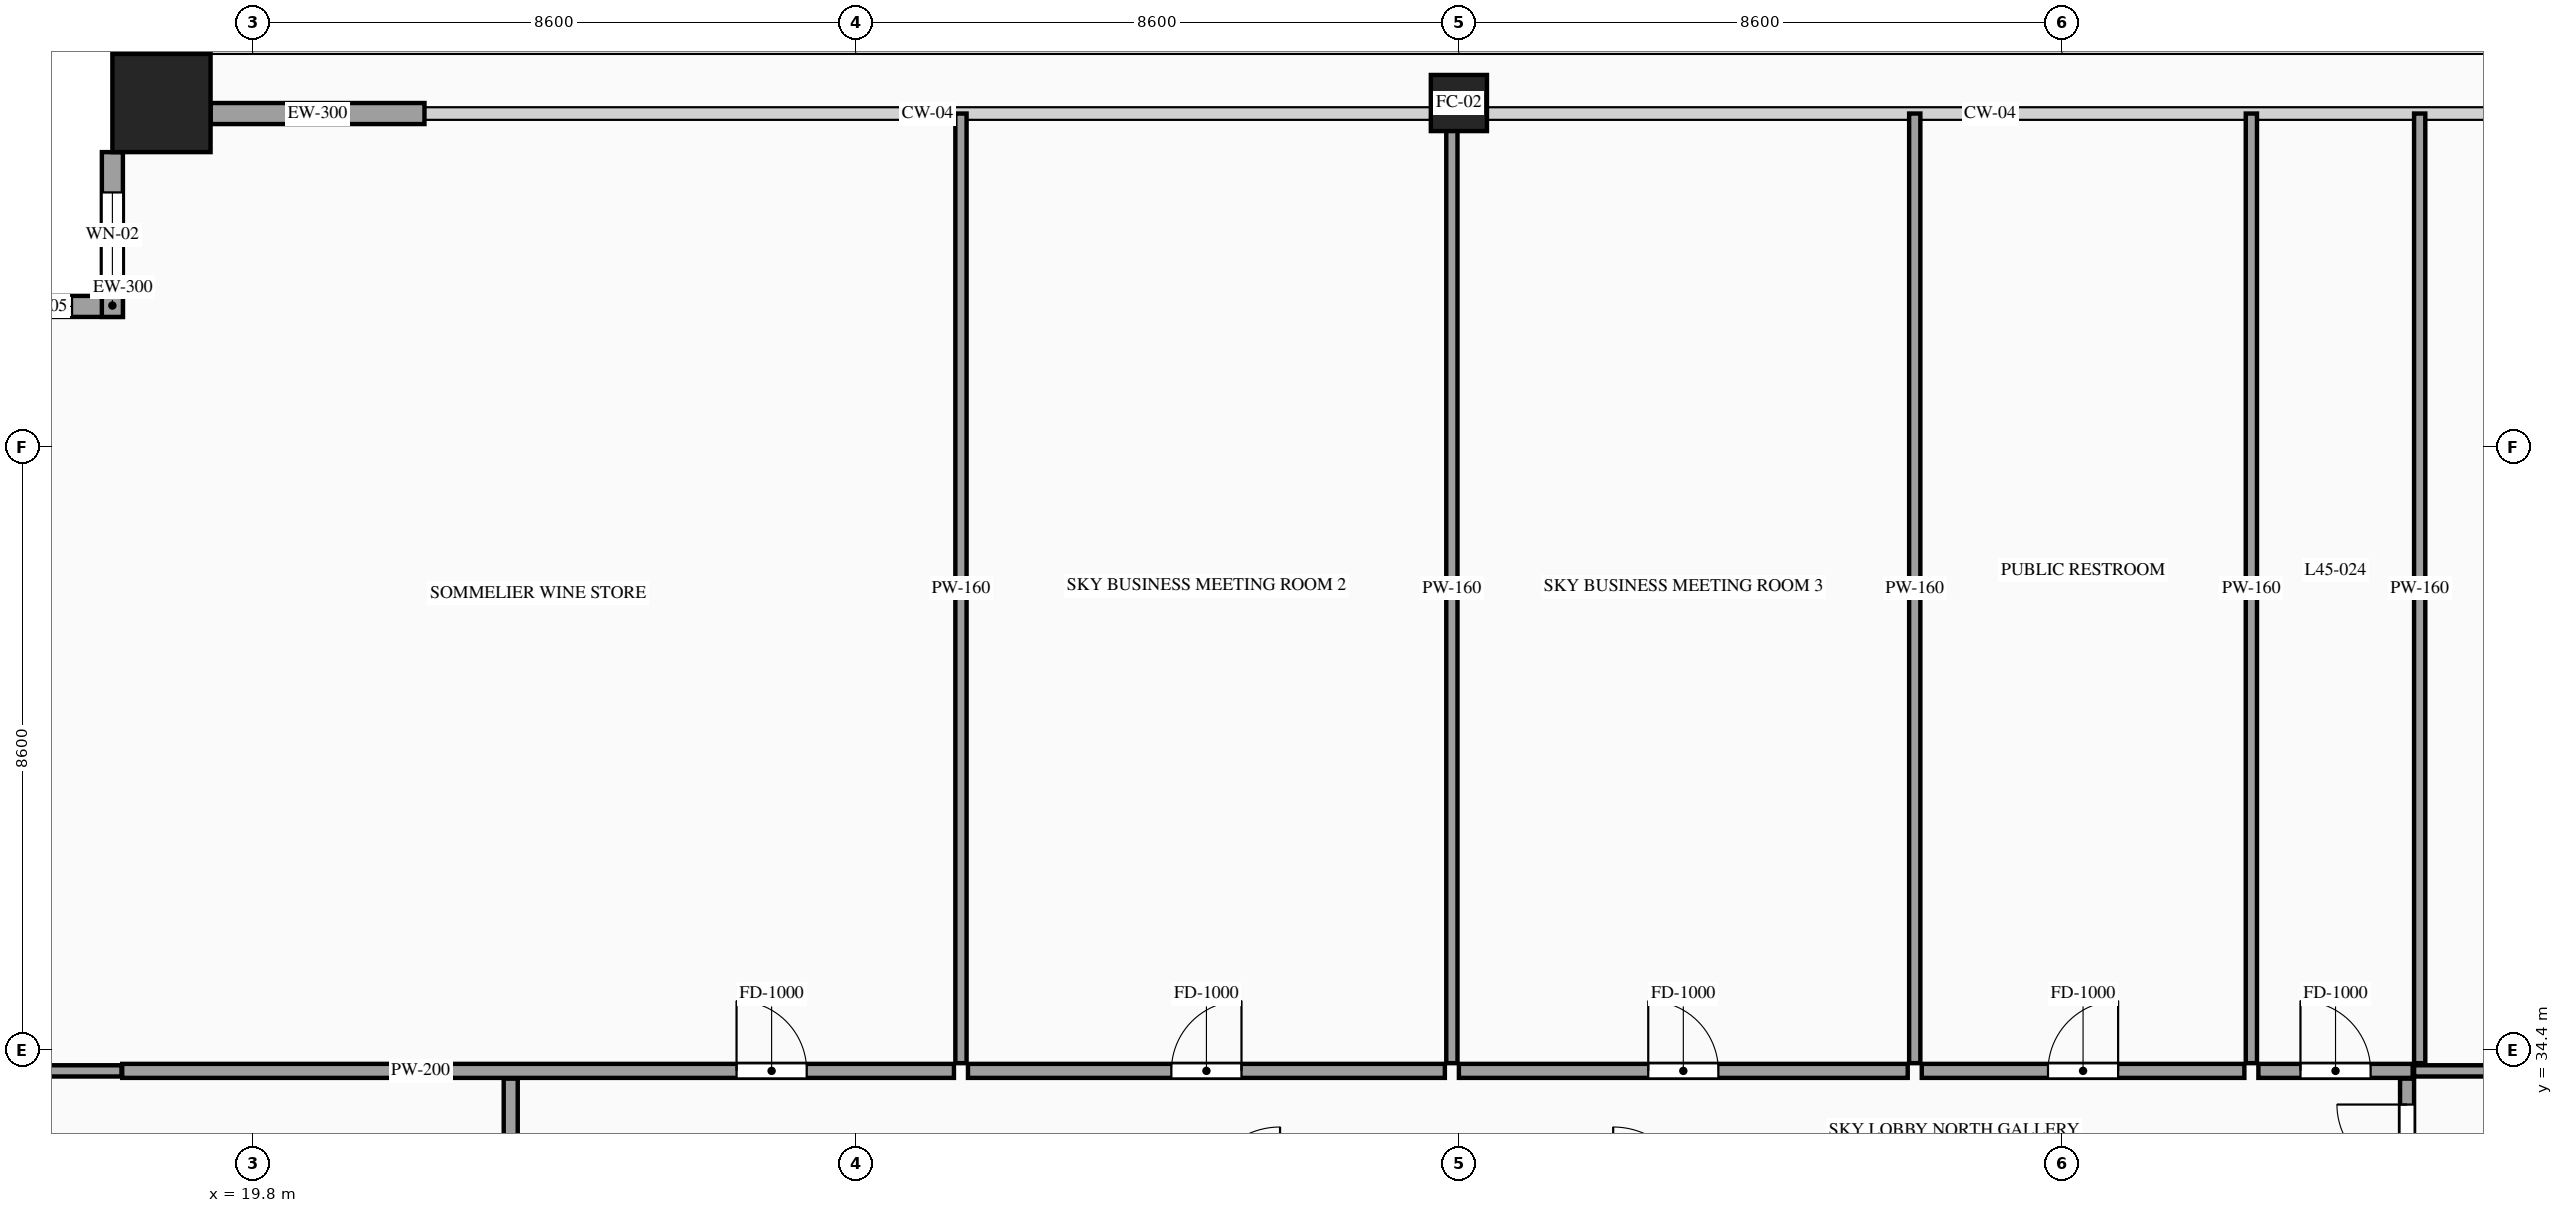
"""IFC4 building model, lengths in metres.
Left out: names, types, materials, properties, quantities, classifications, styles, units other than length and angle.
Written with IfcOpenShell. Run it as: python <this file> out.ifc"""

import sys

from ifc_helpers import new_model, si_unit, direction, frame, frame_2d, origin, origin_2d, place, context, subcontext, project, spatial, rectangle, hollow_rectangle, extrude, source, transform, mapped, element, fill, save


model = new_model("IFC4")
c1 = context("Model", 3, precision=1e-05, world=origin(), true_north=direction((0.0, 1.0)))
c2 = subcontext(c1, "Body", "Model", "MODEL_VIEW")
j1 = project(units=[si_unit("LENGTHUNIT", "METRE"), si_unit("PLANEANGLEUNIT", "RADIAN")], contexts=[c1])
p1 = place(None, origin())
s1 = spatial("IfcSite", under=j1, at=p1, CompositionType="ELEMENT")
p2 = place(p1, origin())
s2 = spatial("IfcBuilding", under=s1, at=p2, CompositionType="ELEMENT")
p3 = place(p2, frame((0.0, 0.0, 171.6)))
s3 = spatial("IfcBuildingStorey", under=s2, at=p3, CompositionType="ELEMENT", Elevation=171.6)
m1 = source(origin(), c2, "Body", "SweptSolid", [
    extrude(hollow_rectangle(XDim=1.4, YDim=1.4, WallThickness=0.06, at=origin_2d()), origin(), (0.0, 0.0, 1.0), 4.8),
])
p4 = place(p3, frame((18.5, 47.9, 0.0), z_axis=(0.0, 0.0, 1.0), x_axis=(1.0, 0.0, 0.0)))
e1 = element("IfcColumn", 1, at=p4, inside=s3, PredefinedType="COLUMN", context=c2, shape_type="MappedRepresentation", body=[
    mapped(m1, transform((0.0, 0.0, 0.0), scale=1.0)),
])
m2 = source(origin(), c2, "Body", "SweptSolid", [
    extrude(hollow_rectangle(XDim=0.8, YDim=0.8, WallThickness=0.036, at=origin_2d()), origin(), (0.0, 0.0, 1.0), 4.8),
])
p5 = place(p3, frame((37.0, 47.9, 0.0), z_axis=(0.0, 0.0, 1.0), x_axis=(1.0, 0.0, 0.0)))
e2 = element("IfcColumn", 2, at=p5, inside=s3, PredefinedType="COLUMN", context=c2, shape_type="MappedRepresentation", body=[
    mapped(m2, transform((0.0, 0.0, 0.0), scale=1.0)),
])
p6 = place(p3, frame((17.95, 45.0, 0.0), z_axis=(0.0, 0.0, 1.0), x_axis=(-1.0, 0.0, 0.0)))
e3 = element("IfcWall", 3, at=p6, inside=s3, PredefinedType="SOLIDWALL", context=c2, shape_type="SweptSolid", body=[
    extrude(rectangle(XDim=2.35, YDim=0.3, at=frame_2d((1.175, 0.0))), origin(), (0.0, 0.0, 1.0), 4.52),
])
p7 = place(p6, frame((0.725, 0.0, 0.85)))
e4 = element("IfcOpeningElement", 4, at=p7, cuts=e3, PredefinedType="OPENING", context=c2, shape_type="SweptSolid", body=[
    extrude(rectangle(XDim=0.9, YDim=1.5, at=frame_2d((0.45, 0.75))), frame((0.0, 0.165, 0.0), z_axis=(0.0, -1.0, 0.0), x_axis=(1.0, 0.0, 0.0)), (0.0, 0.0, 1.0), 0.33),
])
p8 = place(p3, frame((17.8, 47.2, 0.0), z_axis=(0.0, 0.0, 1.0), x_axis=(0.0, -1.0, 0.0)))
e5 = element("IfcWall", 5, at=p8, inside=s3, PredefinedType="SOLIDWALL", context=c2, shape_type="SweptSolid", body=[
    extrude(rectangle(XDim=2.35, YDim=0.3, at=frame_2d((1.175, 0.0))), origin(), (0.0, 0.0, 1.0), 4.52),
])
p9 = place(p8, frame((0.575, 0.0, 0.85)))
e6 = element("IfcOpeningElement", 6, at=p9, cuts=e5, PredefinedType="OPENING", context=c2, shape_type="SweptSolid", body=[
    extrude(rectangle(XDim=1.2, YDim=2.1, at=frame_2d((0.6, 1.05))), frame((0.0, 0.165, 0.0), z_axis=(0.0, -1.0, 0.0), x_axis=(1.0, 0.0, 0.0)), (0.0, 0.0, 1.0), 0.33),
])
m3 = source(origin(), c2, "Body", "SweptSolid", [
    extrude(rectangle(XDim=3.05, YDim=0.3, at=frame_2d((1.525, 0.0))), origin(), (0.0, 0.0, 1.0), 4.075),
])
p10 = place(p3, frame((19.2, 47.75, 0.0), z_axis=(0.0, 0.0, 1.0), x_axis=(1.0, 0.0, 0.0)))
e7 = element("IfcWall", 7, at=p10, inside=s3, PredefinedType="SOLIDWALL", context=c2, shape_type="MappedRepresentation", body=[
    mapped(m3, transform((0.0, 0.0, 0.0), scale=1.0)),
])
m4 = source(origin(), c2, "Body", "SweptSolid", [
    extrude(rectangle(XDim=1.74, YDim=0.2, at=frame_2d((0.87, 0.0))), origin(), (0.0, 0.0, 1.0), 4.52),
])
p11 = place(p3, frame((23.48, 32.25, 0.0), z_axis=(0.0, 0.0, 1.0), x_axis=(0.0, 1.0, 0.0)))
e8 = element("IfcWall", 8, at=p11, inside=s3, PredefinedType="PARTITIONING", context=c2, shape_type="MappedRepresentation", body=[
    mapped(m4, transform((0.0, 0.0, 0.0), scale=1.0)),
])
m5 = source(origin(), c2, "Body", "SweptSolid", [
    extrude(rectangle(XDim=2.88, YDim=0.16, at=frame_2d((1.44, 0.0))), origin(), (0.0, 0.0, 1.0), 4.52),
])
p12 = place(p3, frame((15.05, 34.1, 0.0), z_axis=(0.0, 0.0, 1.0), x_axis=(1.0, 0.0, 0.0)))
e9 = element("IfcWall", 9, at=p12, inside=s3, PredefinedType="PARTITIONING", context=c2, shape_type="MappedRepresentation", body=[
    mapped(m5, transform((0.0, 0.0, 0.0), scale=1.0)),
])
p13 = place(p3, frame((50.52, 32.25, 0.0), z_axis=(0.0, 0.0, 1.0), x_axis=(0.0, 1.0, 0.0)))
e10 = element("IfcWall", 10, at=p13, inside=s3, PredefinedType="PARTITIONING", context=c2, shape_type="SweptSolid", body=[
    extrude(rectangle(XDim=1.74, YDim=0.2, at=frame_2d((0.87, 0.0))), origin(), (0.0, 0.0, 1.0), 4.52),
])
p14 = place(p13, frame((0.37, 0.0, 0.0)))
e11 = element("IfcOpeningElement", 11, at=p14, cuts=e10, PredefinedType="OPENING", context=c2, shape_type="SweptSolid", body=[
    extrude(rectangle(XDim=1.0, YDim=2.2, at=frame_2d((0.5, 1.1))), frame((0.0, 0.115, 0.0), z_axis=(0.0, -1.0, 0.0), x_axis=(1.0, 0.0, 0.0)), (0.0, 0.0, 1.0), 0.23),
])
m6 = source(origin(), c2, "Body", "SweptSolid", [
    extrude(rectangle(XDim=8.33, YDim=0.16, at=frame_2d((4.165, 0.0))), origin(), (0.0, 0.0, 1.0), 4.52),
])
p15 = place(p3, frame((50.62, 34.1, 0.0), z_axis=(0.0, 0.0, 1.0), x_axis=(1.0, 0.0, 0.0)))
e12 = element("IfcWall", 12, at=p15, inside=s3, PredefinedType="PARTITIONING", context=c2, shape_type="MappedRepresentation", body=[
    mapped(m6, transform((0.0, 0.0, 0.0), scale=1.0)),
])
p16 = place(p3, frame((17.94, 34.1, 0.0), z_axis=(0.0, 0.0, 1.0), x_axis=(1.0, 0.0, 0.0)))
e13 = element("IfcWall", 13, at=p16, inside=s3, PredefinedType="PARTITIONING", context=c2, shape_type="SweptSolid", body=[
    extrude(rectangle(XDim=11.86, YDim=0.2, at=frame_2d((5.93, 0.0))), origin(), (0.0, 0.0, 1.0), 4.52),
])
p17 = place(p16, frame((8.76, 0.0, 0.0)))
e14 = element("IfcOpeningElement", 14, at=p17, cuts=e13, PredefinedType="OPENING", context=c2, shape_type="SweptSolid", body=[
    extrude(rectangle(XDim=1.0, YDim=2.2, at=frame_2d((0.5, 1.1))), frame((0.0, 0.115, 0.0), z_axis=(0.0, -1.0, 0.0), x_axis=(1.0, 0.0, 0.0)), (0.0, 0.0, 1.0), 0.23),
])
m7 = source(origin(), c2, "Body", "SweptSolid", [
    extrude(rectangle(XDim=13.54, YDim=0.16, at=frame_2d((6.77, 0.0))), origin(), (0.0, 0.0, 1.0), 4.52),
])
p18 = place(p3, frame((29.9, 34.21, 0.0), z_axis=(0.0, 0.0, 1.0), x_axis=(0.0, 1.0, 0.0)))
e15 = element("IfcWall", 15, at=p18, inside=s3, PredefinedType="PARTITIONING", context=c2, shape_type="MappedRepresentation", body=[
    mapped(m7, transform((0.0, 0.0, 0.0), scale=1.0)),
])
p19 = place(p3, frame((30.0, 34.1, 0.0), z_axis=(0.0, 0.0, 1.0), x_axis=(1.0, 0.0, 0.0)))
e16 = element("IfcWall", 16, at=p19, inside=s3, PredefinedType="PARTITIONING", context=c2, shape_type="SweptSolid", body=[
    extrude(rectangle(XDim=6.8, YDim=0.2, at=frame_2d((3.4, 0.0))), origin(), (0.0, 0.0, 1.0), 4.52),
])
p20 = place(p19, frame((2.9, 0.0, 0.0)))
e17 = element("IfcOpeningElement", 17, at=p20, cuts=e16, PredefinedType="OPENING", context=c2, shape_type="SweptSolid", body=[
    extrude(rectangle(XDim=1.0, YDim=2.2, at=frame_2d((0.5, 1.1))), frame((0.0, 0.115, 0.0), z_axis=(0.0, -1.0, 0.0), x_axis=(1.0, 0.0, 0.0)), (0.0, 0.0, 1.0), 0.23),
])
m8 = source(origin(), c2, "Body", "SweptSolid", [
    extrude(rectangle(XDim=13.54, YDim=0.16, at=frame_2d((6.77, 0.0))), origin(), (0.0, 0.0, 1.0), 3.927),
])
p21 = place(p3, frame((36.9, 34.21, 0.0), z_axis=(0.0, 0.0, 1.0), x_axis=(0.0, 1.0, 0.0)))
e18 = element("IfcWall", 18, at=p21, inside=s3, PredefinedType="PARTITIONING", context=c2, shape_type="MappedRepresentation", body=[
    mapped(m8, transform((0.0, 0.0, 0.0), scale=1.0)),
])
p22 = place(p3, frame((37.0, 34.1, 0.0), z_axis=(0.0, 0.0, 1.0), x_axis=(1.0, 0.0, 0.0)))
e19 = element("IfcWall", 19, at=p22, inside=s3, PredefinedType="PARTITIONING", context=c2, shape_type="SweptSolid", body=[
    extrude(rectangle(XDim=6.4, YDim=0.2, at=frame_2d((3.2, 0.0))), origin(), (0.0, 0.0, 1.0), 4.52),
])
p23 = place(p22, frame((2.7, 0.0, 0.0)))
e20 = element("IfcOpeningElement", 20, at=p23, cuts=e19, PredefinedType="OPENING", context=c2, shape_type="SweptSolid", body=[
    extrude(rectangle(XDim=1.0, YDim=2.2, at=frame_2d((0.5, 1.1))), frame((0.0, 0.115, 0.0), z_axis=(0.0, -1.0, 0.0), x_axis=(1.0, 0.0, 0.0)), (0.0, 0.0, 1.0), 0.23),
])
p24 = place(p3, frame((43.5, 34.21, 0.0), z_axis=(0.0, 0.0, 1.0), x_axis=(0.0, 1.0, 0.0)))
e21 = element("IfcWall", 21, at=p24, inside=s3, PredefinedType="PARTITIONING", context=c2, shape_type="MappedRepresentation", body=[
    mapped(m7, transform((0.0, 0.0, 0.0), scale=1.0)),
])
p25 = place(p3, frame((43.6, 34.1, 0.0), z_axis=(0.0, 0.0, 1.0), x_axis=(1.0, 0.0, 0.0)))
e22 = element("IfcWall", 22, at=p25, inside=s3, PredefinedType="PARTITIONING", context=c2, shape_type="SweptSolid", body=[
    extrude(rectangle(XDim=4.6, YDim=0.2, at=frame_2d((2.3, 0.0))), origin(), (0.0, 0.0, 1.0), 4.52),
])
p26 = place(p25, frame((1.8, 0.0, 0.0)))
e23 = element("IfcOpeningElement", 23, at=p26, cuts=e22, PredefinedType="OPENING", context=c2, shape_type="SweptSolid", body=[
    extrude(rectangle(XDim=1.0, YDim=2.2, at=frame_2d((0.5, 1.1))), frame((0.0, 0.115, 0.0), z_axis=(0.0, -1.0, 0.0), x_axis=(1.0, 0.0, 0.0)), (0.0, 0.0, 1.0), 0.23),
])
p27 = place(p3, frame((48.3, 34.21, 0.0), z_axis=(0.0, 0.0, 1.0), x_axis=(0.0, 1.0, 0.0)))
e24 = element("IfcWall", 24, at=p27, inside=s3, PredefinedType="PARTITIONING", context=c2, shape_type="MappedRepresentation", body=[
    mapped(m7, transform((0.0, 0.0, 0.0), scale=1.0)),
])
p28 = place(p3, frame((48.4, 34.1, 0.0), z_axis=(0.0, 0.0, 1.0), x_axis=(1.0, 0.0, 0.0)))
e25 = element("IfcWall", 25, at=p28, inside=s3, PredefinedType="PARTITIONING", context=c2, shape_type="SweptSolid", body=[
    extrude(rectangle(XDim=2.2, YDim=0.2, at=frame_2d((1.1, 0.0))), origin(), (0.0, 0.0, 1.0), 4.52),
])
p29 = place(p28, frame((0.6, 0.0, 0.0)))
e26 = element("IfcOpeningElement", 26, at=p29, cuts=e25, PredefinedType="OPENING", context=c2, shape_type="SweptSolid", body=[
    extrude(rectangle(XDim=1.0, YDim=2.2, at=frame_2d((0.5, 1.1))), frame((0.0, 0.115, 0.0), z_axis=(0.0, -1.0, 0.0), x_axis=(1.0, 0.0, 0.0)), (0.0, 0.0, 1.0), 0.23),
])
p30 = place(p3, frame((50.7, 34.21, 0.0), z_axis=(0.0, 0.0, 1.0), x_axis=(0.0, 1.0, 0.0)))
e27 = element("IfcWall", 27, at=p30, inside=s3, PredefinedType="PARTITIONING", context=c2, shape_type="MappedRepresentation", body=[
    mapped(m7, transform((0.0, 0.0, 0.0), scale=1.0)),
])
m9 = source(origin(), c2, "Body", "SweptSolid", [
    extrude(rectangle(XDim=0.9, YDim=1.5, at=frame_2d((0.45, 0.75))), frame((0.0, 0.03, 0.0), z_axis=(0.0, -1.0, 0.0), x_axis=(1.0, 0.0, 0.0)), (0.0, 0.0, 1.0), 0.06),
])
p31 = place(p7, origin())
e28 = element("IfcWindow", 28, at=p31, inside=s3, PartitioningType="SINGLE_PANEL", PredefinedType="WINDOW", context=c2, shape_type="MappedRepresentation", body=[
    mapped(m9, transform((0.0, 0.0, 0.0), scale=1.0)),
])
fill(e4, e28)
m10 = source(origin(), c2, "Body", "SweptSolid", [
    extrude(rectangle(XDim=1.2, YDim=2.1, at=frame_2d((0.6, 1.05))), frame((0.0, 0.03, 0.0), z_axis=(0.0, -1.0, 0.0), x_axis=(1.0, 0.0, 0.0)), (0.0, 0.0, 1.0), 0.06),
])
p32 = place(p9, origin())
e29 = element("IfcWindow", 29, at=p32, inside=s3, PartitioningType="SINGLE_PANEL", PredefinedType="WINDOW", context=c2, shape_type="MappedRepresentation", body=[
    mapped(m10, transform((0.0, 0.0, 0.0), scale=1.0)),
])
fill(e6, e29)
m11 = source(origin(), c2, "Body", "SweptSolid", [
    extrude(rectangle(XDim=1.0, YDim=2.2, at=frame_2d((0.5, 1.1))), frame((0.0, 0.025, 0.0), z_axis=(0.0, -1.0, 0.0), x_axis=(1.0, 0.0, 0.0)), (0.0, 0.0, 1.0), 0.05),
])
p33 = place(p14, origin())
e30 = element("IfcDoor", 30, at=p33, inside=s3, OperationType="SINGLE_SWING_RIGHT", PredefinedType="DOOR", context=c2, shape_type="MappedRepresentation", body=[
    mapped(m11, transform((0.0, 0.0, 0.0), scale=1.0)),
])
fill(e11, e30)
p34 = place(p17, origin())
e31 = element("IfcDoor", 31, at=p34, inside=s3, OperationType="SINGLE_SWING_LEFT", PredefinedType="DOOR", context=c2, shape_type="MappedRepresentation", body=[
    mapped(m11, transform((0.0, 0.0, 0.0), scale=1.0)),
])
fill(e14, e31)
p35 = place(p20, origin())
e32 = element("IfcDoor", 32, at=p35, inside=s3, OperationType="SINGLE_SWING_RIGHT", PredefinedType="DOOR", context=c2, shape_type="MappedRepresentation", body=[
    mapped(m11, transform((0.0, 0.0, 0.0), scale=1.0)),
])
fill(e17, e32)
p36 = place(p23, origin())
e33 = element("IfcDoor", 33, at=p36, inside=s3, OperationType="SINGLE_SWING_LEFT", PredefinedType="DOOR", context=c2, shape_type="MappedRepresentation", body=[
    mapped(m11, transform((0.0, 0.0, 0.0), scale=1.0)),
])
fill(e20, e33)
p37 = place(p26, origin())
e34 = element("IfcDoor", 34, at=p37, inside=s3, OperationType="SINGLE_SWING_RIGHT", PredefinedType="DOOR", context=c2, shape_type="MappedRepresentation", body=[
    mapped(m11, transform((0.0, 0.0, 0.0), scale=1.0)),
])
fill(e23, e34)
p38 = place(p29, origin())
e35 = element("IfcDoor", 35, at=p38, inside=s3, OperationType="SINGLE_SWING_LEFT", PredefinedType="DOOR", context=c2, shape_type="MappedRepresentation", body=[
    mapped(m11, transform((0.0, 0.0, 0.0), scale=1.0)),
])
fill(e26, e35)
save(model, sys.argv[1])
